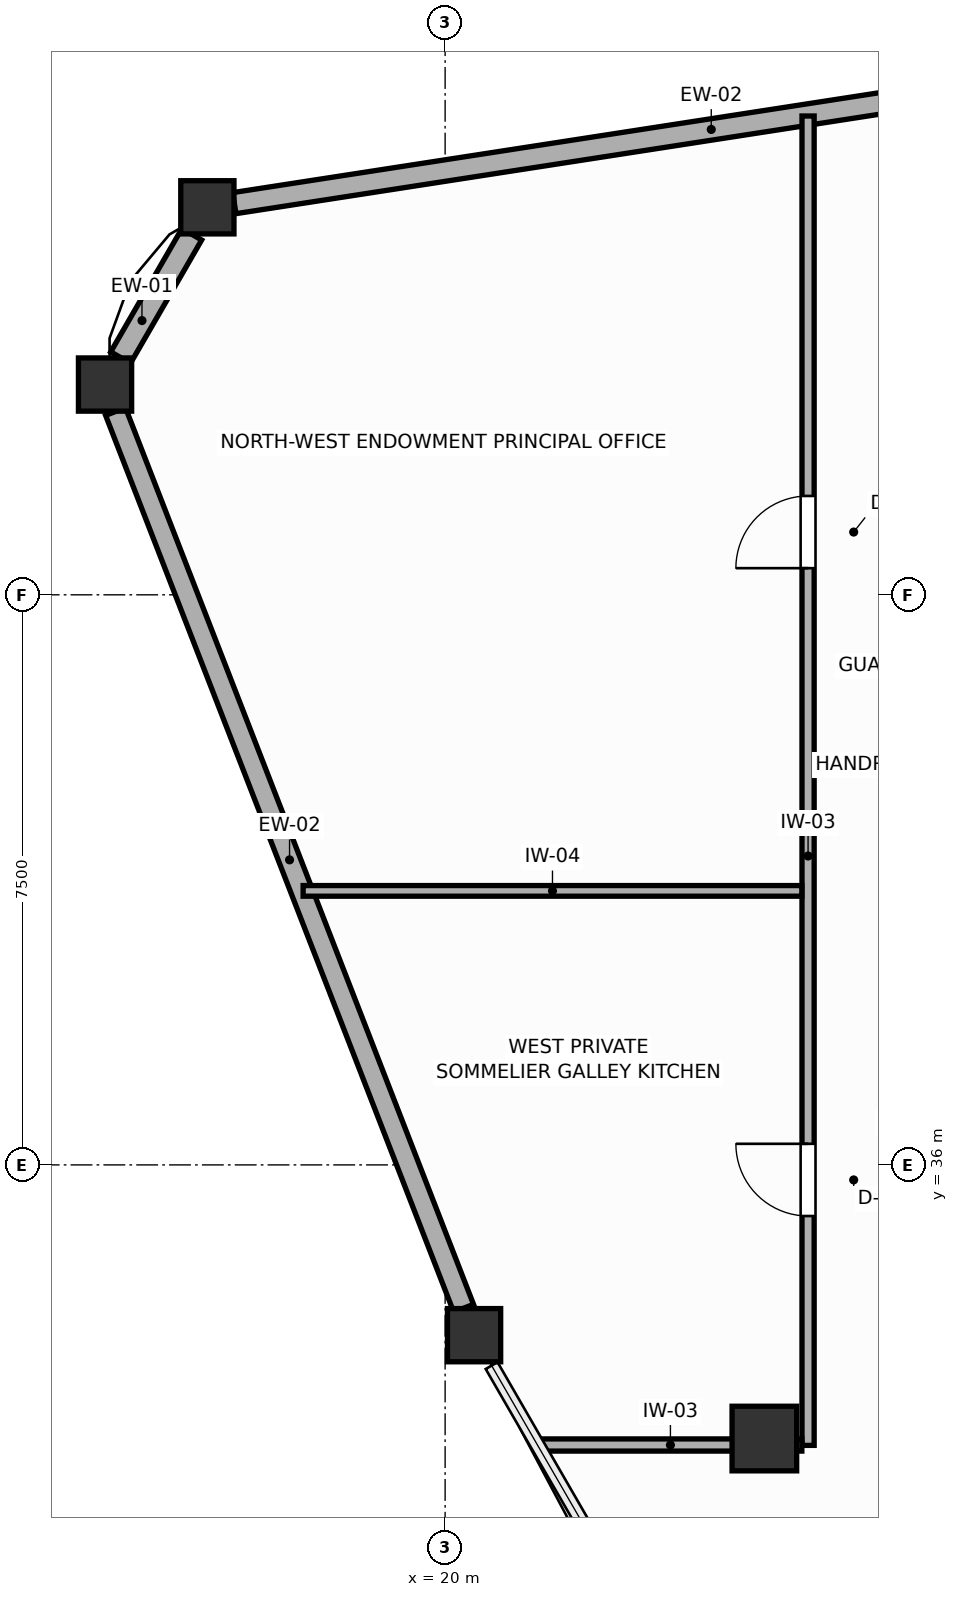
"""IFC4 building model, lengths in metres.
Left out: names, types, materials, properties, quantities, classifications, styles, units other than length and angle.
Written with IfcOpenShell. Run it as: python <this file> out.ifc"""

import sys

from ifc_helpers import new_model, si_unit, direction, frame, frame_2d, origin, origin_2d, place, context, subcontext, project, spatial, rectangle, extrude, source, transform, mapped, element, fill, save


model = new_model("IFC4")
c1 = context("Model", 3, precision=1e-05, world=origin(), true_north=direction((0.0, 1.0)))
c2 = subcontext(c1, "Body", "Model", "MODEL_VIEW")
j1 = project(units=[si_unit("LENGTHUNIT", "METRE"), si_unit("PLANEANGLEUNIT", "RADIAN")], contexts=[c1])
p1 = place(None, origin())
s1 = spatial("IfcSite", under=j1, at=p1, CompositionType="ELEMENT")
p2 = place(p1, origin())
s2 = spatial("IfcBuilding", under=s1, at=p2, CompositionType="ELEMENT")
p3 = place(p2, frame((0.0, 0.0, 271.8)))
s3 = spatial("IfcBuildingStorey", under=s2, at=p3, CompositionType="ELEMENT", Elevation=271.8)
m1 = source(origin(), c2, "Body", "SweptSolid", [
    extrude(rectangle(XDim=0.85, YDim=0.85, at=origin_2d()), origin(), (0.0, 0.0, 1.0), 3.6),
])
p4 = place(p3, frame((24.2, 32.4, 0.0), z_axis=(0.0, 0.0, 1.0), x_axis=(1.0, 0.0, 0.0)))
e1 = element("IfcColumn", 1, at=p4, inside=s3, PredefinedType="COLUMN", context=c2, shape_type="MappedRepresentation", body=[
    mapped(m1, transform((0.0, 0.0, 0.0), scale=1.0)),
])
m2 = source(origin(), c2, "Body", "SweptSolid", [
    extrude(rectangle(XDim=0.7, YDim=0.7, at=origin_2d()), origin(), (0.0, 0.0, 1.0), 3.6),
])
for number, where, z_axis, x_axis in (
    (2, (16.872, 48.598, 0.0), (0.0, 0.0, 1.0), (1.0, 0.0, 0.0)),
    (3, (15.526, 46.266, 0.0), (0.0, 0.0, 1.0), (1.0, 0.0, 0.0)),
    (4, (20.381, 33.76, 0.0), (0.0, 0.0, 1.0), (1.0, 0.0, 0.0)),
):
    element("IfcColumn", number, at=place(p3, frame(where, z_axis=z_axis, x_axis=x_axis)), inside=s3, PredefinedType="COLUMN", context=c2, shape_type="MappedRepresentation", body=[
        mapped(m2, transform((0.0, 0.0, 0.0), scale=1.0)),
    ])
p5 = place(p3, frame((29.775, 50.592, 0.0), z_axis=(0.0, 0.0, 1.0), x_axis=(-0.988271454673, -0.152707340617, 0.0)))
e5 = element("IfcWall", 5, at=p5, inside=s3, PredefinedType="SOLIDWALL", context=c2, shape_type="SweptSolid", body=[
    extrude(rectangle(XDim=12.697, YDim=0.28, at=frame_2d((6.349, 0.0))), origin(), (0.0, 0.0, 1.0), 2.04),
])
p6 = place(p3, frame((16.667, 48.243, 0.0), z_axis=(0.0, 0.0, 1.0), x_axis=(-0.500023421257, -0.866011881093, 0.0)))
e6 = element("IfcWall", 6, at=p6, inside=s3, PredefinedType="SOLIDWALL", context=c2, shape_type="SweptSolid", body=[
    extrude(rectangle(XDim=1.873, YDim=0.3, at=frame_2d((0.936, 0.0))), origin(), (0.0, 0.0, 1.0), 2.04),
])
p7 = place(p3, frame((15.664, 45.911, 0.0), z_axis=(0.0, 0.0, 1.0), x_axis=(0.3618810561, -0.932224276253, 0.0)))
e7 = element("IfcWall", 7, at=p7, inside=s3, PredefinedType="SOLIDWALL", context=c2, shape_type="SweptSolid", body=[
    extrude(rectangle(XDim=12.654, YDim=0.28, at=frame_2d((6.327, 0.0))), origin(), (0.0, 0.0, 1.0), 2.04),
])
p8 = place(p3, frame((24.775, 32.31, 0.0), z_axis=(0.0, 0.0, 1.0), x_axis=(0.0, 1.0, 0.0)))
e8 = element("IfcWall", 8, at=p8, inside=s3, PredefinedType="PARTITIONING", context=c2, shape_type="SweptSolid", body=[
    extrude(rectangle(XDim=17.489, YDim=0.16, at=frame_2d((8.745, 0.0))), origin(), (0.0, 0.0, 1.0), 3.18),
])
p9 = place(p8, frame((3.018, 0.0, 0.0)))
e9 = element("IfcOpeningElement", 9, at=p9, cuts=e8, PredefinedType="OPENING", context=c2, shape_type="SweptSolid", body=[
    extrude(rectangle(XDim=0.95, YDim=2.05, at=frame_2d((0.475, 1.025))), frame((0.0, 0.09, 0.0), z_axis=(0.0, -1.0, 0.0), x_axis=(1.0, 0.0, 0.0)), (0.0, 0.0, 1.0), 0.18),
])
p10 = place(p8, frame((11.541, 0.0, 0.0)))
e10 = element("IfcOpeningElement", 10, at=p10, cuts=e8, PredefinedType="OPENING", context=c2, shape_type="SweptSolid", body=[
    extrude(rectangle(XDim=0.95, YDim=2.05, at=frame_2d((0.475, 1.025))), frame((0.0, 0.09, 0.0), z_axis=(0.0, -1.0, 0.0), x_axis=(1.0, 0.0, 0.0)), (0.0, 0.0, 1.0), 0.18),
])
p11 = place(p3, frame((21.235, 32.315, 0.0), z_axis=(0.0, 0.0, 1.0), x_axis=(1.0, 0.0, 0.0)))
e11 = element("IfcWall", 11, at=p11, inside=s3, PredefinedType="PARTITIONING", context=c2, shape_type="SweptSolid", body=[
    extrude(rectangle(XDim=3.458, YDim=0.16, at=frame_2d((1.729, 0.0))), origin(), (0.0, 0.0, 1.0), 2.04),
])
p12 = place(p3, frame((18.132, 39.605, 0.0), z_axis=(0.0, 0.0, 1.0), x_axis=(1.0, 0.0, 0.0)))
e12 = element("IfcWall", 12, at=p12, inside=s3, PredefinedType="PARTITIONING", context=c2, shape_type="SweptSolid", body=[
    extrude(rectangle(XDim=6.562, YDim=0.14, at=frame_2d((3.281, 0.0))), origin(), (0.0, 0.0, 1.0), 3.18),
])
p13 = place(p9, origin())
e13 = element("IfcDoor", 13, at=p13, inside=s3, OperationType="SINGLE_SWING_RIGHT", PredefinedType="DOOR", context=c2, shape_type="SweptSolid", body=[
    extrude(rectangle(XDim=0.95, YDim=2.05, at=frame_2d((0.475, 1.025))), frame((0.0, 0.025, 0.0), z_axis=(0.0, -1.0, 0.0), x_axis=(1.0, 0.0, 0.0)), (0.0, 0.0, 1.0), 0.05),
])
fill(e9, e13)
p14 = place(p10, origin())
e14 = element("IfcDoor", 14, at=p14, inside=s3, OperationType="SINGLE_SWING_LEFT", PredefinedType="DOOR", context=c2, shape_type="SweptSolid", body=[
    extrude(rectangle(XDim=0.95, YDim=2.05, at=frame_2d((0.475, 1.025))), frame((0.0, 0.025, 0.0), z_axis=(0.0, -1.0, 0.0), x_axis=(1.0, 0.0, 0.0)), (0.0, 0.0, 1.0), 0.05),
])
fill(e10, e14)
save(model, sys.argv[1])
